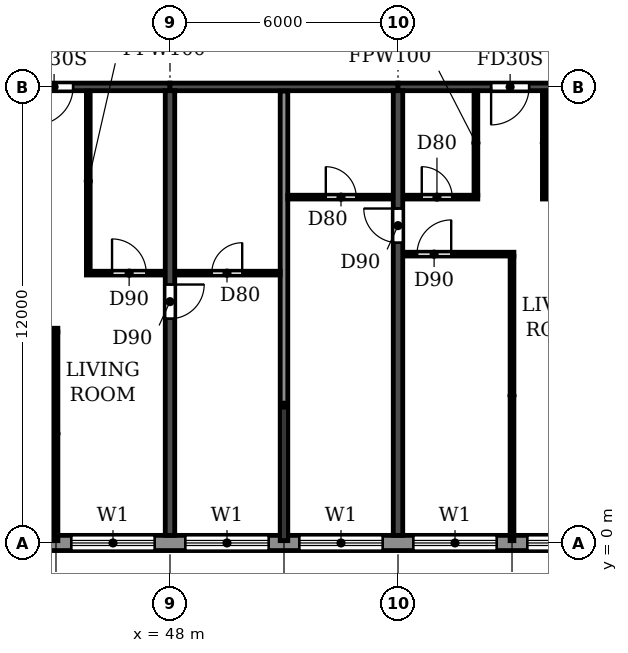
"""IFC4 building model, lengths in metres.
Left out: names, types, materials, properties, quantities, classifications, styles, units other than length and angle.
Written with IfcOpenShell. Run it as: python <this file> out.ifc"""

import sys

from ifc_helpers import new_model, si_unit, direction, frame, frame_2d, origin, place, context, subcontext, project, spatial, rectangle, extrude, element, fill, save


model = new_model("IFC4")
c1 = context("Model", 3, precision=1e-05, world=origin(), true_north=direction((0.0, 1.0)))
c2 = subcontext(c1, "Body", "Model", "MODEL_VIEW")
j1 = project(units=[si_unit("LENGTHUNIT", "METRE"), si_unit("PLANEANGLEUNIT", "RADIAN")], contexts=[c1])
p1 = place(None, origin())
s1 = spatial("IfcSite", under=j1, at=p1, CompositionType="ELEMENT")
p2 = place(p1, origin())
s2 = spatial("IfcBuilding", under=s1, at=p2, CompositionType="ELEMENT")
p3 = place(p2, frame((0.0, 0.0, 181.8)))
s3 = spatial("IfcBuildingStorey", under=s2, at=p3, CompositionType="ELEMENT", Elevation=181.8)
p4 = place(p3, frame((48.0, 0.2, 0.0), z_axis=(0.0, 0.0, 1.0), x_axis=(0.0, 1.0, 0.0)))
e1 = element("IfcWall", 1, at=p4, inside=s3, PredefinedType="SHEAR", context=c2, shape_type="SweptSolid", body=[
    extrude(rectangle(XDim=11.7, YDim=0.25, at=frame_2d((5.85, 0.0))), origin(), (0.0, 0.0, 1.0), 3.08),
])
p5 = place(p4, frame((5.7, 0.0, 0.0)))
e2 = element("IfcOpeningElement", 2, at=p5, cuts=e1, PredefinedType="OPENING", context=c2, shape_type="SweptSolid", body=[
    extrude(rectangle(XDim=0.9, YDim=2.1, at=frame_2d((0.45, 1.05))), frame((0.0, 0.135, 0.0), z_axis=(0.0, -1.0, 0.0), x_axis=(1.0, 0.0, 0.0)), (0.0, 0.0, 1.0), 0.27),
])
p6 = place(p3, frame((54.0, 0.2, 0.0), z_axis=(0.0, 0.0, 1.0), x_axis=(0.0, 1.0, 0.0)))
e3 = element("IfcWall", 3, at=p6, inside=s3, PredefinedType="SHEAR", context=c2, shape_type="SweptSolid", body=[
    extrude(rectangle(XDim=11.7, YDim=0.25, at=frame_2d((5.85, 0.0))), origin(), (0.0, 0.0, 1.0), 3.08),
])
p7 = place(p6, frame((7.7, 0.0, 0.0)))
e4 = element("IfcOpeningElement", 4, at=p7, cuts=e3, PredefinedType="OPENING", context=c2, shape_type="SweptSolid", body=[
    extrude(rectangle(XDim=0.9, YDim=2.1, at=frame_2d((0.45, 1.05))), frame((0.0, 0.135, 0.0), z_axis=(0.0, -1.0, 0.0), x_axis=(1.0, 0.0, 0.0)), (0.0, 0.0, 1.0), 0.27),
])
p8 = place(p3, frame((42.0, 12.0, 0.0), z_axis=(0.0, 0.0, 1.0), x_axis=(1.0, 0.0, 0.0)))
e5 = element("IfcWall", 5, at=p8, inside=s3, PredefinedType="SHEAR", context=c2, shape_type="SweptSolid", body=[
    extrude(rectangle(XDim=6.0, YDim=0.2, at=frame_2d((3.0, 0.0))), origin(), (0.0, 0.0, 1.0), 2.48),
])
p9 = place(p8, frame((2.45, 0.0, 0.0)))
e6 = element("IfcOpeningElement", 6, at=p9, cuts=e5, PredefinedType="OPENING", context=c2, shape_type="SweptSolid", body=[
    extrude(rectangle(XDim=1.0, YDim=2.1, at=frame_2d((0.5, 1.05))), frame((0.0, 0.11, 0.0), z_axis=(0.0, -1.0, 0.0), x_axis=(1.0, 0.0, 0.0)), (0.0, 0.0, 1.0), 0.22),
])
p10 = place(p3, frame((48.0, 12.0, 0.0), z_axis=(0.0, 0.0, 1.0), x_axis=(1.0, 0.0, 0.0)))
e7 = element("IfcWall", 7, at=p10, inside=s3, PredefinedType="SHEAR", context=c2, shape_type="SweptSolid", body=[
    extrude(rectangle(XDim=6.0, YDim=0.2, at=frame_2d((3.0, 0.0))), origin(), (0.0, 0.0, 1.0), 2.48),
])
p11 = place(p3, frame((54.0, 12.0, 0.0), z_axis=(0.0, 0.0, 1.0), x_axis=(1.0, 0.0, 0.0)))
e8 = element("IfcWall", 8, at=p11, inside=s3, PredefinedType="SHEAR", context=c2, shape_type="SweptSolid", body=[
    extrude(rectangle(XDim=6.0, YDim=0.2, at=frame_2d((3.0, 0.0))), origin(), (0.0, 0.0, 1.0), 2.48),
])
p12 = place(p11, frame((2.45, 0.0, 0.0)))
e9 = element("IfcOpeningElement", 9, at=p12, cuts=e8, PredefinedType="OPENING", context=c2, shape_type="SweptSolid", body=[
    extrude(rectangle(XDim=1.0, YDim=2.1, at=frame_2d((0.5, 1.05))), frame((0.0, 0.11, 0.0), z_axis=(0.0, -1.0, 0.0), x_axis=(1.0, 0.0, 0.0)), (0.0, 0.0, 1.0), 0.22),
])
p13 = place(p3, frame((22.683, 0.0, 0.0), z_axis=(0.0, 0.0, 1.0), x_axis=(1.0, 0.0, 0.0)))
e10 = element("IfcWall", 10, at=p13, inside=s3, PredefinedType="STANDARD", context=c2, shape_type="SweptSolid", body=[
    extrude(rectangle(XDim=56.634, YDim=0.4, at=frame_2d((28.317, 0.0))), origin(), (0.0, 0.0, 1.0), 3.08),
])
p14 = place(p13, frame((1.717, 0.0, 0.9)))
e11 = element("IfcOpeningElement", 11, at=p14, cuts=e10, PredefinedType="OPENING", context=c2, shape_type="SweptSolid", body=[
    extrude(rectangle(XDim=2.2, YDim=1.5, at=frame_2d((1.1, 0.75))), frame((0.0, 0.21, 0.0), z_axis=(0.0, -1.0, 0.0), x_axis=(1.0, 0.0, 0.0)), (0.0, 0.0, 1.0), 0.42),
])
p15 = place(p13, frame((4.917, 0.0, 0.0)))
e12 = element("IfcOpeningElement", 12, at=p15, cuts=e10, PredefinedType="OPENING", context=c2, shape_type="SweptSolid", body=[
    extrude(rectangle(XDim=1.8, YDim=2.4, at=frame_2d((0.9, 1.2))), frame((0.0, 0.21, 0.0), z_axis=(0.0, -1.0, 0.0), x_axis=(1.0, 0.0, 0.0)), (0.0, 0.0, 1.0), 0.42),
])
p16 = place(p13, frame((7.717, 0.0, 0.9)))
e13 = element("IfcOpeningElement", 13, at=p16, cuts=e10, PredefinedType="OPENING", context=c2, shape_type="SweptSolid", body=[
    extrude(rectangle(XDim=2.2, YDim=1.5, at=frame_2d((1.1, 0.75))), frame((0.0, 0.21, 0.0), z_axis=(0.0, -1.0, 0.0), x_axis=(1.0, 0.0, 0.0)), (0.0, 0.0, 1.0), 0.42),
])
p17 = place(p13, frame((10.717, 0.0, 0.9)))
e14 = element("IfcOpeningElement", 14, at=p17, cuts=e10, PredefinedType="OPENING", context=c2, shape_type="SweptSolid", body=[
    extrude(rectangle(XDim=2.2, YDim=1.5, at=frame_2d((1.1, 0.75))), frame((0.0, 0.21, 0.0), z_axis=(0.0, -1.0, 0.0), x_axis=(1.0, 0.0, 0.0)), (0.0, 0.0, 1.0), 0.42),
])
p18 = place(p13, frame((13.717, 0.0, 0.9)))
e15 = element("IfcOpeningElement", 15, at=p18, cuts=e10, PredefinedType="OPENING", context=c2, shape_type="SweptSolid", body=[
    extrude(rectangle(XDim=2.2, YDim=1.5, at=frame_2d((1.1, 0.75))), frame((0.0, 0.21, 0.0), z_axis=(0.0, -1.0, 0.0), x_axis=(1.0, 0.0, 0.0)), (0.0, 0.0, 1.0), 0.42),
])
p19 = place(p13, frame((16.717, 0.0, 0.9)))
e16 = element("IfcOpeningElement", 16, at=p19, cuts=e10, PredefinedType="OPENING", context=c2, shape_type="SweptSolid", body=[
    extrude(rectangle(XDim=2.2, YDim=1.5, at=frame_2d((1.1, 0.75))), frame((0.0, 0.21, 0.0), z_axis=(0.0, -1.0, 0.0), x_axis=(1.0, 0.0, 0.0)), (0.0, 0.0, 1.0), 0.42),
])
p20 = place(p13, frame((19.717, 0.0, 0.9)))
e17 = element("IfcOpeningElement", 17, at=p20, cuts=e10, PredefinedType="OPENING", context=c2, shape_type="SweptSolid", body=[
    extrude(rectangle(XDim=2.2, YDim=1.5, at=frame_2d((1.1, 0.75))), frame((0.0, 0.21, 0.0), z_axis=(0.0, -1.0, 0.0), x_axis=(1.0, 0.0, 0.0)), (0.0, 0.0, 1.0), 0.42),
])
p21 = place(p13, frame((22.717, 0.0, 0.9)))
e18 = element("IfcOpeningElement", 18, at=p21, cuts=e10, PredefinedType="OPENING", context=c2, shape_type="SweptSolid", body=[
    extrude(rectangle(XDim=2.2, YDim=1.5, at=frame_2d((1.1, 0.75))), frame((0.0, 0.21, 0.0), z_axis=(0.0, -1.0, 0.0), x_axis=(1.0, 0.0, 0.0)), (0.0, 0.0, 1.0), 0.42),
])
p22 = place(p13, frame((25.717, 0.0, 0.9)))
e19 = element("IfcOpeningElement", 19, at=p22, cuts=e10, PredefinedType="OPENING", context=c2, shape_type="SweptSolid", body=[
    extrude(rectangle(XDim=2.2, YDim=1.5, at=frame_2d((1.1, 0.75))), frame((0.0, 0.21, 0.0), z_axis=(0.0, -1.0, 0.0), x_axis=(1.0, 0.0, 0.0)), (0.0, 0.0, 1.0), 0.42),
])
p23 = place(p13, frame((28.717, 0.0, 0.9)))
e20 = element("IfcOpeningElement", 20, at=p23, cuts=e10, PredefinedType="OPENING", context=c2, shape_type="SweptSolid", body=[
    extrude(rectangle(XDim=2.2, YDim=1.5, at=frame_2d((1.1, 0.75))), frame((0.0, 0.21, 0.0), z_axis=(0.0, -1.0, 0.0), x_axis=(1.0, 0.0, 0.0)), (0.0, 0.0, 1.0), 0.42),
])
p24 = place(p13, frame((31.717, 0.0, 0.9)))
e21 = element("IfcOpeningElement", 21, at=p24, cuts=e10, PredefinedType="OPENING", context=c2, shape_type="SweptSolid", body=[
    extrude(rectangle(XDim=2.2, YDim=1.5, at=frame_2d((1.1, 0.75))), frame((0.0, 0.21, 0.0), z_axis=(0.0, -1.0, 0.0), x_axis=(1.0, 0.0, 0.0)), (0.0, 0.0, 1.0), 0.42),
])
p25 = place(p13, frame((34.717, 0.0, 0.9)))
e22 = element("IfcOpeningElement", 22, at=p25, cuts=e10, PredefinedType="OPENING", context=c2, shape_type="SweptSolid", body=[
    extrude(rectangle(XDim=2.2, YDim=1.5, at=frame_2d((1.1, 0.75))), frame((0.0, 0.21, 0.0), z_axis=(0.0, -1.0, 0.0), x_axis=(1.0, 0.0, 0.0)), (0.0, 0.0, 1.0), 0.42),
])
p26 = place(p13, frame((37.917, 0.0, 0.0)))
e23 = element("IfcOpeningElement", 23, at=p26, cuts=e10, PredefinedType="OPENING", context=c2, shape_type="SweptSolid", body=[
    extrude(rectangle(XDim=1.8, YDim=2.4, at=frame_2d((0.9, 1.2))), frame((0.0, 0.21, 0.0), z_axis=(0.0, -1.0, 0.0), x_axis=(1.0, 0.0, 0.0)), (0.0, 0.0, 1.0), 0.42),
])
p27 = place(p13, frame((40.717, 0.0, 0.9)))
e24 = element("IfcOpeningElement", 24, at=p27, cuts=e10, PredefinedType="OPENING", context=c2, shape_type="SweptSolid", body=[
    extrude(rectangle(XDim=2.2, YDim=1.5, at=frame_2d((1.1, 0.75))), frame((0.0, 0.21, 0.0), z_axis=(0.0, -1.0, 0.0), x_axis=(1.0, 0.0, 0.0)), (0.0, 0.0, 1.0), 0.42),
])
p28 = place(p13, frame((43.717, 0.0, 0.9)))
e25 = element("IfcOpeningElement", 25, at=p28, cuts=e10, PredefinedType="OPENING", context=c2, shape_type="SweptSolid", body=[
    extrude(rectangle(XDim=2.2, YDim=1.5, at=frame_2d((1.1, 0.75))), frame((0.0, 0.21, 0.0), z_axis=(0.0, -1.0, 0.0), x_axis=(1.0, 0.0, 0.0)), (0.0, 0.0, 1.0), 0.42),
])
p29 = place(p13, frame((46.717, 0.0, 0.9)))
e26 = element("IfcOpeningElement", 26, at=p29, cuts=e10, PredefinedType="OPENING", context=c2, shape_type="SweptSolid", body=[
    extrude(rectangle(XDim=2.2, YDim=1.5, at=frame_2d((1.1, 0.75))), frame((0.0, 0.21, 0.0), z_axis=(0.0, -1.0, 0.0), x_axis=(1.0, 0.0, 0.0)), (0.0, 0.0, 1.0), 0.42),
])
p30 = place(p13, frame((49.917, 0.0, 0.0)))
e27 = element("IfcOpeningElement", 27, at=p30, cuts=e10, PredefinedType="OPENING", context=c2, shape_type="SweptSolid", body=[
    extrude(rectangle(XDim=1.8, YDim=2.4, at=frame_2d((0.9, 1.2))), frame((0.0, 0.21, 0.0), z_axis=(0.0, -1.0, 0.0), x_axis=(1.0, 0.0, 0.0)), (0.0, 0.0, 1.0), 0.42),
])
p31 = place(p13, frame((52.717, 0.0, 0.9)))
e28 = element("IfcOpeningElement", 28, at=p31, cuts=e10, PredefinedType="OPENING", context=c2, shape_type="SweptSolid", body=[
    extrude(rectangle(XDim=2.2, YDim=1.5, at=frame_2d((1.1, 0.75))), frame((0.0, 0.21, 0.0), z_axis=(0.0, -1.0, 0.0), x_axis=(1.0, 0.0, 0.0)), (0.0, 0.0, 1.0), 0.42),
])
p32 = place(p3, frame((51.0, 0.06, 0.0), z_axis=(0.0, 0.0, 1.0), x_axis=(0.0, 1.0, 0.0)))
e29 = element("IfcWall", 29, at=p32, inside=s3, PredefinedType="PARTITIONING", context=c2, shape_type="SweptSolid", body=[
    extrude(rectangle(XDim=11.83, YDim=0.2, at=frame_2d((5.915, 0.0))), origin(), (0.0, 0.0, 1.0), 3.08),
])
p33 = place(p3, frame((42.135, 5.6, 0.0), z_axis=(0.0, 0.0, 1.0), x_axis=(1.0, 0.0, 0.0)))
e30 = element("IfcWall", 30, at=p33, inside=s3, PredefinedType="PARTITIONING", context=c2, shape_type="SweptSolid", body=[
    extrude(rectangle(XDim=2.915, YDim=0.1, at=frame_2d((1.458, 0.0))), origin(), (0.0, 0.0, 1.0), 3.08),
])
p34 = place(p33, frame((1.465, 0.0, 0.0)))
e31 = element("IfcOpeningElement", 31, at=p34, cuts=e30, PredefinedType="OPENING", context=c2, shape_type="SweptSolid", body=[
    extrude(rectangle(XDim=0.9, YDim=2.1, at=frame_2d((0.45, 1.05))), frame((0.0, 0.06, 0.0), z_axis=(0.0, -1.0, 0.0), x_axis=(1.0, 0.0, 0.0)), (0.0, 0.0, 1.0), 0.12),
])
p35 = place(p3, frame((45.8, 7.1, 0.0), z_axis=(0.0, 0.0, 1.0), x_axis=(1.0, 0.0, 0.0)))
e32 = element("IfcWall", 32, at=p35, inside=s3, PredefinedType="PARTITIONING", context=c2, shape_type="SweptSolid", body=[
    extrude(rectangle(XDim=2.065, YDim=0.1, at=frame_2d((1.032, 0.0))), origin(), (0.0, 0.0, 1.0), 3.08),
])
p36 = place(p35, frame((0.675, 0.0, 0.0)))
e33 = element("IfcOpeningElement", 33, at=p36, cuts=e32, PredefinedType="OPENING", context=c2, shape_type="SweptSolid", body=[
    extrude(rectangle(XDim=0.9, YDim=2.1, at=frame_2d((0.45, 1.05))), frame((0.0, 0.06, 0.0), z_axis=(0.0, -1.0, 0.0), x_axis=(1.0, 0.0, 0.0)), (0.0, 0.0, 1.0), 0.12),
])
p37 = place(p3, frame((48.135, 7.1, 0.0), z_axis=(0.0, 0.0, 1.0), x_axis=(1.0, 0.0, 0.0)))
e34 = element("IfcWall", 34, at=p37, inside=s3, PredefinedType="PARTITIONING", context=c2, shape_type="SweptSolid", body=[
    extrude(rectangle(XDim=2.765, YDim=0.1, at=frame_2d((1.382, 0.0))), origin(), (0.0, 0.0, 1.0), 3.08),
])
p38 = place(p37, frame((0.965, 0.0, 0.0)))
e35 = element("IfcOpeningElement", 35, at=p38, cuts=e34, PredefinedType="OPENING", context=c2, shape_type="SweptSolid", body=[
    extrude(rectangle(XDim=0.8, YDim=2.1, at=frame_2d((0.4, 1.05))), frame((0.0, 0.06, 0.0), z_axis=(0.0, -1.0, 0.0), x_axis=(1.0, 0.0, 0.0)), (0.0, 0.0, 1.0), 0.12),
])
p39 = place(p3, frame((54.135, 7.6, 0.0), z_axis=(0.0, 0.0, 1.0), x_axis=(1.0, 0.0, 0.0)))
e36 = element("IfcWall", 36, at=p39, inside=s3, PredefinedType="PARTITIONING", context=c2, shape_type="SweptSolid", body=[
    extrude(rectangle(XDim=2.915, YDim=0.1, at=frame_2d((1.458, 0.0))), origin(), (0.0, 0.0, 1.0), 3.08),
])
p40 = place(p39, frame((0.365, 0.0, 0.0)))
e37 = element("IfcOpeningElement", 37, at=p40, cuts=e36, PredefinedType="OPENING", context=c2, shape_type="SweptSolid", body=[
    extrude(rectangle(XDim=0.9, YDim=2.1, at=frame_2d((0.45, 1.05))), frame((0.0, 0.06, 0.0), z_axis=(0.0, -1.0, 0.0), x_axis=(1.0, 0.0, 0.0)), (0.0, 0.0, 1.0), 0.12),
])
p41 = place(p3, frame((51.1, 9.1, 0.0), z_axis=(0.0, 0.0, 1.0), x_axis=(1.0, 0.0, 0.0)))
e38 = element("IfcWall", 38, at=p41, inside=s3, PredefinedType="PARTITIONING", context=c2, shape_type="SweptSolid", body=[
    extrude(rectangle(XDim=2.765, YDim=0.1, at=frame_2d((1.382, 0.0))), origin(), (0.0, 0.0, 1.0), 3.08),
])
p42 = place(p41, frame((1.0, 0.0, 0.0)))
e39 = element("IfcOpeningElement", 39, at=p42, cuts=e38, PredefinedType="OPENING", context=c2, shape_type="SweptSolid", body=[
    extrude(rectangle(XDim=0.8, YDim=2.1, at=frame_2d((0.4, 1.05))), frame((0.0, 0.06, 0.0), z_axis=(0.0, -1.0, 0.0), x_axis=(1.0, 0.0, 0.0)), (0.0, 0.0, 1.0), 0.12),
])
p43 = place(p3, frame((54.135, 9.1, 0.0), z_axis=(0.0, 0.0, 1.0), x_axis=(1.0, 0.0, 0.0)))
e40 = element("IfcWall", 40, at=p43, inside=s3, PredefinedType="PARTITIONING", context=c2, shape_type="SweptSolid", body=[
    extrude(rectangle(XDim=1.965, YDim=0.1, at=frame_2d((0.982, 0.0))), origin(), (0.0, 0.0, 1.0), 3.08),
])
p44 = place(p43, frame((0.49, 0.0, 0.0)))
e41 = element("IfcOpeningElement", 41, at=p44, cuts=e40, PredefinedType="OPENING", context=c2, shape_type="SweptSolid", body=[
    extrude(rectangle(XDim=0.8, YDim=2.1, at=frame_2d((0.4, 1.05))), frame((0.0, 0.06, 0.0), z_axis=(0.0, -1.0, 0.0), x_axis=(1.0, 0.0, 0.0)), (0.0, 0.0, 1.0), 0.12),
])
p45 = place(p3, frame((57.8, 9.1, 0.0), z_axis=(0.0, 0.0, 1.0), x_axis=(1.0, 0.0, 0.0)))
e42 = element("IfcWall", 42, at=p45, inside=s3, PredefinedType="PARTITIONING", context=c2, shape_type="SweptSolid", body=[
    extrude(rectangle(XDim=2.065, YDim=0.1, at=frame_2d((1.032, 0.0))), origin(), (0.0, 0.0, 1.0), 3.08),
])
p46 = place(p45, frame((0.675, 0.0, 0.0)))
e43 = element("IfcOpeningElement", 43, at=p46, cuts=e42, PredefinedType="OPENING", context=c2, shape_type="SweptSolid", body=[
    extrude(rectangle(XDim=0.9, YDim=2.1, at=frame_2d((0.45, 1.05))), frame((0.0, 0.06, 0.0), z_axis=(0.0, -1.0, 0.0), x_axis=(1.0, 0.0, 0.0)), (0.0, 0.0, 1.0), 0.12),
])
p47 = place(p3, frame((45.0, 0.06, 0.0), z_axis=(0.0, 0.0, 1.0), x_axis=(0.0, 1.0, 0.0)))
e44 = element("IfcWall", 44, at=p47, inside=s3, PredefinedType="PARTITIONING", context=c2, shape_type="SweptSolid", body=[
    extrude(rectangle(XDim=5.49, YDim=0.1, at=frame_2d((2.745, 0.0))), origin(), (0.0, 0.0, 1.0), 3.08),
])
p48 = place(p3, frame((45.85, 7.15, 0.0), z_axis=(0.0, 0.0, 1.0), x_axis=(0.0, 1.0, 0.0)))
e45 = element("IfcWall", 45, at=p48, inside=s3, PredefinedType="PARTITIONING", context=c2, shape_type="SweptSolid", body=[
    extrude(rectangle(XDim=4.74, YDim=0.1, at=frame_2d((2.37, 0.0))), origin(), (0.0, 0.0, 1.0), 3.08),
])
p49 = place(p3, frame((56.05, 9.15, 0.0), z_axis=(0.0, 0.0, 1.0), x_axis=(0.0, 1.0, 0.0)))
e46 = element("IfcWall", 46, at=p49, inside=s3, PredefinedType="PARTITIONING", context=c2, shape_type="SweptSolid", body=[
    extrude(rectangle(XDim=2.74, YDim=0.1, at=frame_2d((1.37, 0.0))), origin(), (0.0, 0.0, 1.0), 3.08),
])
p50 = place(p3, frame((57.0, 0.06, 0.0), z_axis=(0.0, 0.0, 1.0), x_axis=(0.0, 1.0, 0.0)))
e47 = element("IfcWall", 47, at=p50, inside=s3, PredefinedType="PARTITIONING", context=c2, shape_type="SweptSolid", body=[
    extrude(rectangle(XDim=7.49, YDim=0.1, at=frame_2d((3.745, 0.0))), origin(), (0.0, 0.0, 1.0), 3.08),
])
p51 = place(p3, frame((57.85, 9.15, 0.0), z_axis=(0.0, 0.0, 1.0), x_axis=(0.0, 1.0, 0.0)))
e48 = element("IfcWall", 48, at=p51, inside=s3, PredefinedType="PARTITIONING", context=c2, shape_type="SweptSolid", body=[
    extrude(rectangle(XDim=2.74, YDim=0.1, at=frame_2d((1.37, 0.0))), origin(), (0.0, 0.0, 1.0), 3.08),
])
p52 = place(p21, origin())
e49 = element("IfcWindow", 49, at=p52, inside=s3, PartitioningType="DOUBLE_PANEL_HORIZONTAL", PredefinedType="WINDOW", context=c2, shape_type="SweptSolid", body=[
    extrude(rectangle(XDim=2.2, YDim=1.5, at=frame_2d((1.1, 0.75))), frame((0.0, 0.03, 0.0), z_axis=(0.0, -1.0, 0.0), x_axis=(1.0, 0.0, 0.0)), (0.0, 0.0, 1.0), 0.06),
])
fill(e18, e49)
p53 = place(p22, origin())
e50 = element("IfcWindow", 50, at=p53, inside=s3, PartitioningType="DOUBLE_PANEL_HORIZONTAL", PredefinedType="WINDOW", context=c2, shape_type="SweptSolid", body=[
    extrude(rectangle(XDim=2.2, YDim=1.5, at=frame_2d((1.1, 0.75))), frame((0.0, 0.03, 0.0), z_axis=(0.0, -1.0, 0.0), x_axis=(1.0, 0.0, 0.0)), (0.0, 0.0, 1.0), 0.06),
])
fill(e19, e50)
p54 = place(p23, origin())
e51 = element("IfcWindow", 51, at=p54, inside=s3, PartitioningType="DOUBLE_PANEL_HORIZONTAL", PredefinedType="WINDOW", context=c2, shape_type="SweptSolid", body=[
    extrude(rectangle(XDim=2.2, YDim=1.5, at=frame_2d((1.1, 0.75))), frame((0.0, 0.03, 0.0), z_axis=(0.0, -1.0, 0.0), x_axis=(1.0, 0.0, 0.0)), (0.0, 0.0, 1.0), 0.06),
])
fill(e20, e51)
p55 = place(p24, origin())
e52 = element("IfcWindow", 52, at=p55, inside=s3, PartitioningType="DOUBLE_PANEL_HORIZONTAL", PredefinedType="WINDOW", context=c2, shape_type="SweptSolid", body=[
    extrude(rectangle(XDim=2.2, YDim=1.5, at=frame_2d((1.1, 0.75))), frame((0.0, 0.03, 0.0), z_axis=(0.0, -1.0, 0.0), x_axis=(1.0, 0.0, 0.0)), (0.0, 0.0, 1.0), 0.06),
])
fill(e21, e52)
p56 = place(p25, origin())
e53 = element("IfcWindow", 53, at=p56, inside=s3, PartitioningType="DOUBLE_PANEL_HORIZONTAL", PredefinedType="WINDOW", context=c2, shape_type="SweptSolid", body=[
    extrude(rectangle(XDim=2.2, YDim=1.5, at=frame_2d((1.1, 0.75))), frame((0.0, 0.03, 0.0), z_axis=(0.0, -1.0, 0.0), x_axis=(1.0, 0.0, 0.0)), (0.0, 0.0, 1.0), 0.06),
])
fill(e22, e53)
p57 = place(p38, origin())
e54 = element("IfcDoor", 54, at=p57, inside=s3, OperationType="SINGLE_SWING_RIGHT", PredefinedType="DOOR", context=c2, shape_type="SweptSolid", body=[
    extrude(rectangle(XDim=0.8, YDim=2.1, at=frame_2d((0.4, 1.05))), frame((0.0, 0.025, 0.0), z_axis=(0.0, -1.0, 0.0), x_axis=(1.0, 0.0, 0.0)), (0.0, 0.0, 1.0), 0.05),
])
fill(e35, e54)
p58 = place(p9, frame((1.0, 0.0, 0.0), z_axis=(0.0, 0.0, 1.0), x_axis=(-1.0, 0.0, 0.0)))
e55 = element("IfcDoor", 55, at=p58, inside=s3, OperationType="SINGLE_SWING_RIGHT", PredefinedType="DOOR", context=c2, shape_type="SweptSolid", body=[
    extrude(rectangle(XDim=1.0, YDim=2.1, at=frame_2d((0.5, 1.05))), frame((0.0, 0.025, 0.0), z_axis=(0.0, -1.0, 0.0), x_axis=(1.0, 0.0, 0.0)), (0.0, 0.0, 1.0), 0.05),
])
fill(e6, e55)
p59 = place(p36, origin())
e56 = element("IfcDoor", 56, at=p59, inside=s3, OperationType="SINGLE_SWING_LEFT", PredefinedType="DOOR", context=c2, shape_type="SweptSolid", body=[
    extrude(rectangle(XDim=0.9, YDim=2.1, at=frame_2d((0.45, 1.05))), frame((0.0, 0.025, 0.0), z_axis=(0.0, -1.0, 0.0), x_axis=(1.0, 0.0, 0.0)), (0.0, 0.0, 1.0), 0.05),
])
fill(e33, e56)
p60 = place(p5, frame((0.9, 0.0, 0.0), z_axis=(0.0, 0.0, 1.0), x_axis=(-1.0, 0.0, 0.0)))
e57 = element("IfcDoor", 57, at=p60, inside=s3, OperationType="SINGLE_SWING_LEFT", PredefinedType="DOOR", context=c2, shape_type="SweptSolid", body=[
    extrude(rectangle(XDim=0.9, YDim=2.1, at=frame_2d((0.45, 1.05))), frame((0.0, 0.025, 0.0), z_axis=(0.0, -1.0, 0.0), x_axis=(1.0, 0.0, 0.0)), (0.0, 0.0, 1.0), 0.05),
])
fill(e2, e57)
p61 = place(p42, origin())
e58 = element("IfcDoor", 58, at=p61, inside=s3, OperationType="SINGLE_SWING_LEFT", PredefinedType="DOOR", context=c2, shape_type="SweptSolid", body=[
    extrude(rectangle(XDim=0.8, YDim=2.1, at=frame_2d((0.4, 1.05))), frame((0.0, 0.025, 0.0), z_axis=(0.0, -1.0, 0.0), x_axis=(1.0, 0.0, 0.0)), (0.0, 0.0, 1.0), 0.05),
])
fill(e39, e58)
p62 = place(p7, origin())
e59 = element("IfcDoor", 59, at=p62, inside=s3, OperationType="SINGLE_SWING_RIGHT", PredefinedType="DOOR", context=c2, shape_type="SweptSolid", body=[
    extrude(rectangle(XDim=0.9, YDim=2.1, at=frame_2d((0.45, 1.05))), frame((0.0, 0.025, 0.0), z_axis=(0.0, -1.0, 0.0), x_axis=(1.0, 0.0, 0.0)), (0.0, 0.0, 1.0), 0.05),
])
fill(e4, e59)
p63 = place(p40, origin())
e60 = element("IfcDoor", 60, at=p63, inside=s3, OperationType="SINGLE_SWING_RIGHT", PredefinedType="DOOR", context=c2, shape_type="SweptSolid", body=[
    extrude(rectangle(XDim=0.9, YDim=2.1, at=frame_2d((0.45, 1.05))), frame((0.0, 0.025, 0.0), z_axis=(0.0, -1.0, 0.0), x_axis=(1.0, 0.0, 0.0)), (0.0, 0.0, 1.0), 0.05),
])
fill(e37, e60)
p64 = place(p44, origin())
e61 = element("IfcDoor", 61, at=p64, inside=s3, OperationType="SINGLE_SWING_LEFT", PredefinedType="DOOR", context=c2, shape_type="SweptSolid", body=[
    extrude(rectangle(XDim=0.8, YDim=2.1, at=frame_2d((0.4, 1.05))), frame((0.0, 0.025, 0.0), z_axis=(0.0, -1.0, 0.0), x_axis=(1.0, 0.0, 0.0)), (0.0, 0.0, 1.0), 0.05),
])
fill(e41, e61)
p65 = place(p12, frame((1.0, 0.0, 0.0), z_axis=(0.0, 0.0, 1.0), x_axis=(-1.0, 0.0, 0.0)))
e62 = element("IfcDoor", 62, at=p65, inside=s3, OperationType="SINGLE_SWING_RIGHT", PredefinedType="DOOR", context=c2, shape_type="SweptSolid", body=[
    extrude(rectangle(XDim=1.0, YDim=2.1, at=frame_2d((0.5, 1.05))), frame((0.0, 0.025, 0.0), z_axis=(0.0, -1.0, 0.0), x_axis=(1.0, 0.0, 0.0)), (0.0, 0.0, 1.0), 0.05),
])
fill(e9, e62)
save(model, sys.argv[1])
